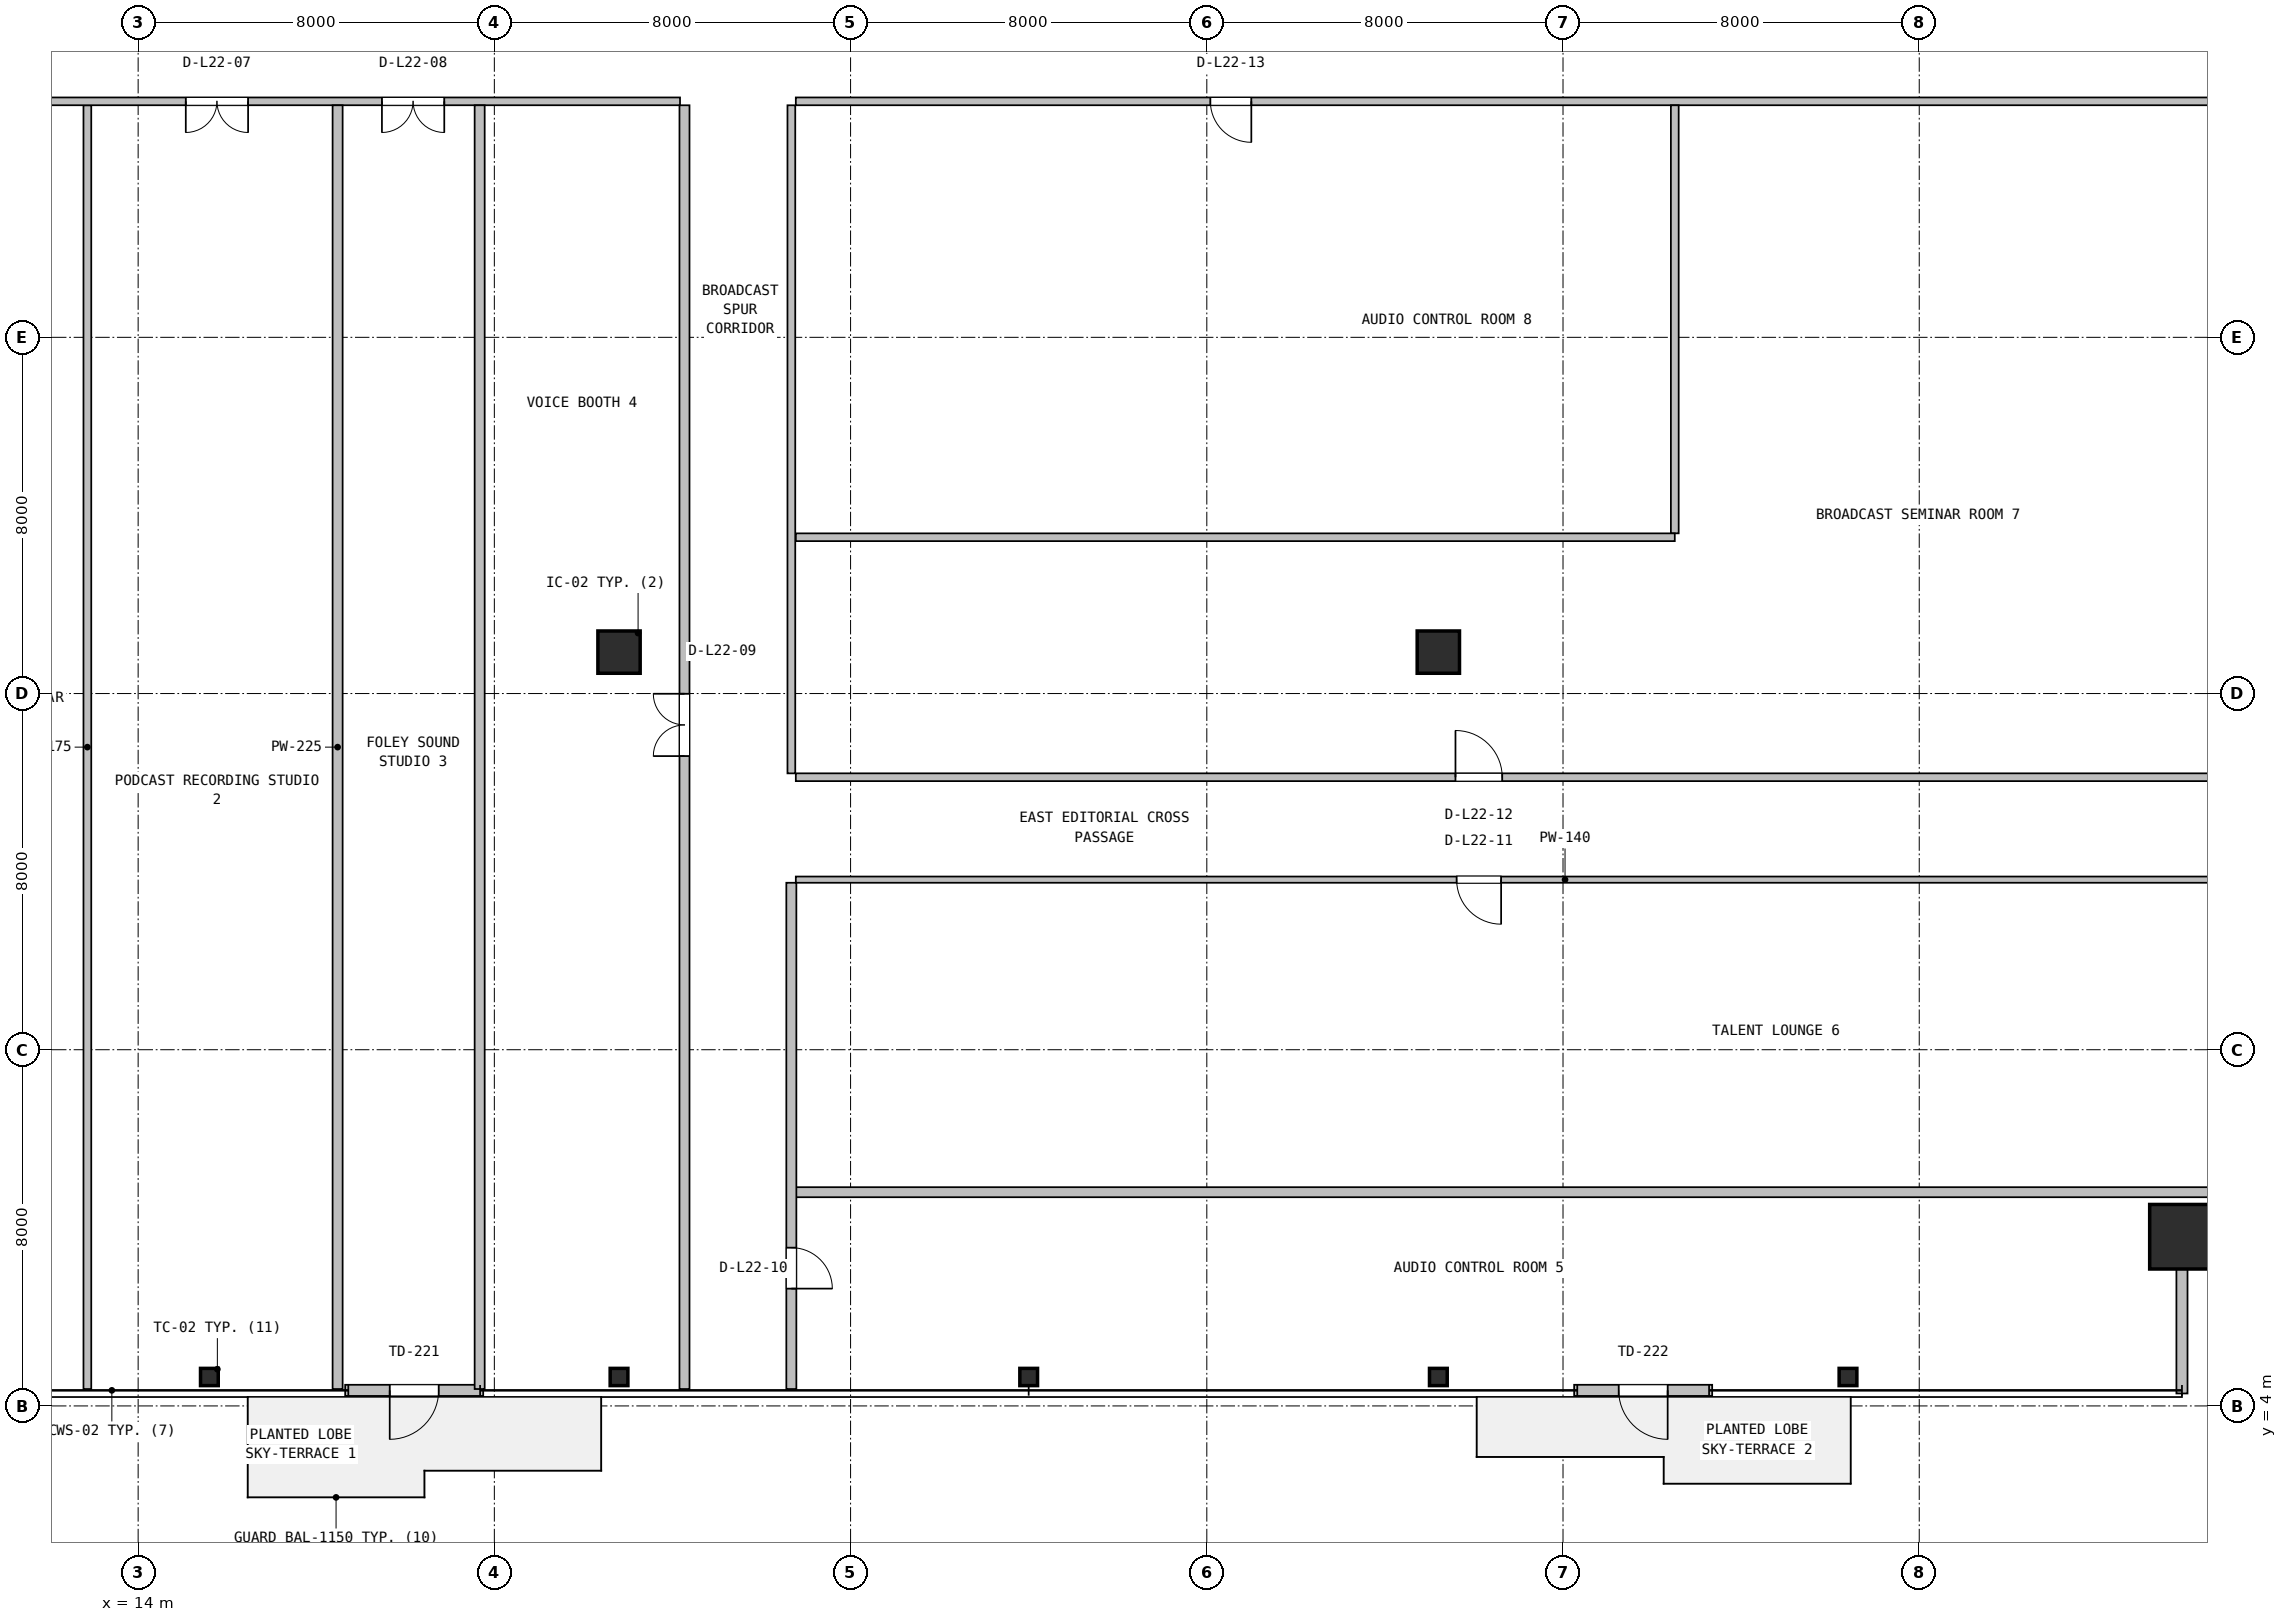
"""IFC4 building model, lengths in metres.
Left out: names, types, materials, properties, quantities, classifications, styles, units other than length and angle.
Written with IfcOpenShell. Run it as: python <this file> out.ifc"""

import sys

from ifc_helpers import new_model, si_unit, direction, frame, frame_2d, origin, origin_2d, place, context, subcontext, project, spatial, rectangle, hollow_rectangle, i_section, extrude, source, transform, mapped, element, fill, save


model = new_model("IFC4")
c1 = context("Model", 3, precision=1e-05, world=origin(), true_north=direction((0.0, 1.0)))
c2 = subcontext(c1, "Body", "Model", "MODEL_VIEW")
j1 = project(units=[si_unit("LENGTHUNIT", "METRE"), si_unit("PLANEANGLEUNIT", "RADIAN")], contexts=[c1])
p1 = place(None, origin())
s1 = spatial("IfcSite", under=j1, at=p1, CompositionType="ELEMENT")
p2 = place(p1, origin())
s2 = spatial("IfcBuilding", under=s1, at=p2, CompositionType="ELEMENT")
p3 = place(p2, frame((0.0, 0.0, 94.6)))
s3 = spatial("IfcBuildingStorey", under=s2, at=p3, CompositionType="ELEMENT", Elevation=94.6)
m1 = source(origin(), c2, "Body", "SweptSolid", [
    extrude(hollow_rectangle(XDim=1.45, YDim=1.45, WallThickness=0.055, at=origin_2d()), origin(), (0.0, 0.0, 1.0), 3.8),
])
p4 = place(p3, frame((59.9, 7.8, 0.0), z_axis=(0.0, 0.0, 1.0), x_axis=(1.0, 0.0, 0.0)))
e1 = element("IfcColumn", 1, at=p4, inside=s3, PredefinedType="COLUMN", context=c2, shape_type="MappedRepresentation", body=[
    mapped(m1, transform((0.0, 0.0, 0.0), x_axis=(1.0, 0.0, 0.0), y_axis=(0.0, 1.0, 0.0), z_axis=(0.0, 0.0, 1.0), scale=1.0)),
])
m2 = source(origin(), c2, "Body", "SweptSolid", [
    extrude(i_section(OverallWidth=0.398, OverallDepth=0.387, WebThickness=0.021, FlangeThickness=0.033, FilletRadius=0.018, at=origin_2d()), origin(), (0.0, 0.0, 1.0), 3.8),
])
for number, where, z_axis, x_axis in (
    (2, (15.6, 4.65, 0.0), (0.0, 0.0, 1.0), (1.0, 0.0, 0.0)),
    (3, (24.8, 4.65, 0.0), (0.0, 0.0, 1.0), (1.0, 0.0, 0.0)),
    (4, (34.0, 4.65, 0.0), (0.0, 0.0, 1.0), (1.0, 0.0, 0.0)),
    (5, (43.2, 4.65, 0.0), (0.0, 0.0, 1.0), (1.0, 0.0, 0.0)),
    (6, (52.4, 4.65, 0.0), (0.0, 0.0, 1.0), (1.0, 0.0, 0.0)),
):
    element("IfcColumn", number, at=place(p3, frame(where, z_axis=z_axis, x_axis=x_axis)), inside=s3, PredefinedType="COLUMN", context=c2, shape_type="MappedRepresentation", body=[
        mapped(m2, transform((0.0, 0.0, 0.0), x_axis=(1.0, 0.0, 0.0), y_axis=(0.0, 1.0, 0.0), z_axis=(0.0, 0.0, 1.0), scale=1.0)),
    ])
m3 = source(origin(), c2, "Body", "SweptSolid", [
    extrude(rectangle(XDim=0.95, YDim=0.95, at=origin_2d()), origin(), (0.0, 0.0, 1.0), 3.8),
])
for number, where, z_axis, x_axis in (
    (7, (24.8, 20.93, 0.0), (0.0, 0.0, 1.0), (1.0, 0.0, 0.0)),
    (8, (43.2, 20.93, 0.0), (0.0, 0.0, 1.0), (1.0, 0.0, 0.0)),
):
    element("IfcColumn", number, at=place(p3, frame(where, z_axis=z_axis, x_axis=x_axis)), inside=s3, PredefinedType="COLUMN", context=c2, shape_type="MappedRepresentation", body=[
        mapped(m3, transform((0.0, 0.0, 0.0), x_axis=(1.0, 0.0, 0.0), y_axis=(0.0, 1.0, 0.0), z_axis=(0.0, 0.0, 1.0), scale=1.0)),
    ])
p5 = place(p3, frame((18.65, 4.35, 0.0), z_axis=(0.0, 0.0, 1.0), x_axis=(1.0, 0.0, 0.0)))
e9 = element("IfcWall", 9, at=p5, inside=s3, PredefinedType="SOLIDWALL", context=c2, shape_type="SweptSolid", body=[
    extrude(rectangle(XDim=3.1, YDim=0.25, at=frame_2d((1.55, 0.0))), origin(), (0.0, 0.0, 1.0), 3.5),
])
p6 = place(p5, frame((1.0, 0.0, 0.0)))
e10 = element("IfcOpeningElement", 10, at=p6, cuts=e9, PredefinedType="OPENING", context=c2, shape_type="SweptSolid", body=[
    extrude(rectangle(XDim=1.1, YDim=2.15, at=frame_2d((0.55, 1.075))), frame((0.0, 0.135, 0.0), z_axis=(0.0, -1.0, 0.0), x_axis=(1.0, 0.0, 0.0)), (0.0, 0.0, 1.0), 0.27),
])
p7 = place(p3, frame((46.25, 4.35, 0.0), z_axis=(0.0, 0.0, 1.0), x_axis=(1.0, 0.0, 0.0)))
e11 = element("IfcWall", 11, at=p7, inside=s3, PredefinedType="SOLIDWALL", context=c2, shape_type="SweptSolid", body=[
    extrude(rectangle(XDim=3.1, YDim=0.25, at=frame_2d((1.55, 0.0))), origin(), (0.0, 0.0, 1.0), 3.5),
])
p8 = place(p7, frame((1.0, 0.0, 0.0)))
e12 = element("IfcOpeningElement", 12, at=p8, cuts=e11, PredefinedType="OPENING", context=c2, shape_type="SweptSolid", body=[
    extrude(rectangle(XDim=1.1, YDim=2.15, at=frame_2d((0.55, 1.075))), frame((0.0, 0.135, 0.0), z_axis=(0.0, -1.0, 0.0), x_axis=(1.0, 0.0, 0.0)), (0.0, 0.0, 1.0), 0.27),
])
p9 = place(p3, frame((59.9, 4.28, 0.0), z_axis=(0.0, 0.0, 1.0), x_axis=(0.0, 1.0, 0.0)))
e13 = element("IfcWall", 13, at=p9, inside=s3, PredefinedType="SOLIDWALL", context=c2, shape_type="SweptSolid", body=[
    extrude(rectangle(XDim=3.6, YDim=0.25, at=frame_2d((1.8, 0.0))), origin(), (0.0, 0.0, 1.0), 3.078),
])
p10 = place(p3, frame((12.86, 4.38, 0.0), z_axis=(0.0, 0.0, 1.0), x_axis=(0.0, 1.0, 0.0)))
e14 = element("IfcWall", 14, at=p10, inside=s3, PredefinedType="PARTITIONING", context=c2, shape_type="SweptSolid", body=[
    extrude(rectangle(XDim=28.832, YDim=0.175, at=frame_2d((14.416, 0.0))), origin(), (0.0, 0.0, 1.0), 3.078),
])
p11 = place(p3, frame((4.68, 33.3, 0.0), z_axis=(0.0, 0.0, 1.0), x_axis=(1.0, 0.0, 0.0)))
e15 = element("IfcWall", 15, at=p11, inside=s3, PredefinedType="PARTITIONING", context=c2, shape_type="SweptSolid", body=[
    extrude(rectangle(XDim=21.49, YDim=0.175, at=frame_2d((10.745, 0.0))), origin(), (0.0, 0.0, 1.0), 2.8),
])
p12 = place(p11, frame((5.5, 0.0, 0.0)))
e16 = element("IfcOpeningElement", 16, at=p12, cuts=e15, PredefinedType="OPENING", context=c2, shape_type="SweptSolid", body=[
    extrude(rectangle(XDim=1.05, YDim=2.1, at=frame_2d((0.525, 1.05))), frame((0.0, 0.098, 0.0), z_axis=(0.0, -1.0, 0.0), x_axis=(1.0, 0.0, 0.0)), (0.0, 0.0, 1.0), 0.195),
])
p13 = place(p11, frame((10.39, 0.0, 0.0)))
e17 = element("IfcOpeningElement", 17, at=p13, cuts=e15, PredefinedType="OPENING", context=c2, shape_type="SweptSolid", body=[
    extrude(rectangle(XDim=1.4, YDim=2.12, at=frame_2d((0.7, 1.06))), frame((0.0, 0.098, 0.0), z_axis=(0.0, -1.0, 0.0), x_axis=(1.0, 0.0, 0.0)), (0.0, 0.0, 1.0), 0.195),
])
p14 = place(p11, frame((14.795, 0.0, 0.0)))
e18 = element("IfcOpeningElement", 18, at=p14, cuts=e15, PredefinedType="OPENING", context=c2, shape_type="SweptSolid", body=[
    extrude(rectangle(XDim=1.4, YDim=2.12, at=frame_2d((0.7, 1.06))), frame((0.0, 0.098, 0.0), z_axis=(0.0, -1.0, 0.0), x_axis=(1.0, 0.0, 0.0)), (0.0, 0.0, 1.0), 0.195),
])
for number, where, z_axis, x_axis in (
    (19, (18.48, 4.38, 0.0), (0.0, 0.0, 1.0), (0.0, 1.0, 0.0)),
    (20, (21.67, 4.38, 0.0), (0.0, 0.0, 1.0), (0.0, 1.0, 0.0)),
):
    element("IfcWall", number, at=place(p3, frame(where, z_axis=z_axis, x_axis=x_axis)), inside=s3, PredefinedType="PARTITIONING", context=c2, shape_type="SweptSolid", body=[
        extrude(rectangle(XDim=28.832, YDim=0.225, at=frame_2d((14.416, 0.0))), origin(), (0.0, 0.0, 1.0), 3.078),
    ])
p15 = place(p3, frame((26.27, 4.38, 0.0), z_axis=(0.0, 0.0, 1.0), x_axis=(0.0, 1.0, 0.0)))
e21 = element("IfcWall", 21, at=p15, inside=s3, PredefinedType="PARTITIONING", context=c2, shape_type="SweptSolid", body=[
    extrude(rectangle(XDim=28.832, YDim=0.225, at=frame_2d((14.416, 0.0))), origin(), (0.0, 0.0, 1.0), 2.8),
])
p16 = place(p15, frame((14.215, 0.0, 0.0)))
e22 = element("IfcOpeningElement", 22, at=p16, cuts=e21, PredefinedType="OPENING", context=c2, shape_type="SweptSolid", body=[
    extrude(rectangle(XDim=1.4, YDim=2.12, at=frame_2d((0.7, 1.06))), frame((0.0, 0.123, 0.0), z_axis=(0.0, -1.0, 0.0), x_axis=(1.0, 0.0, 0.0)), (0.0, 0.0, 1.0), 0.245),
])
p17 = place(p3, frame((28.77, 8.8, 0.0), z_axis=(0.0, 0.0, 1.0), x_axis=(1.0, 0.0, 0.0)))
e23 = element("IfcWall", 23, at=p17, inside=s3, PredefinedType="PARTITIONING", context=c2, shape_type="SweptSolid", body=[
    extrude(rectangle(XDim=34.55, YDim=0.225, at=frame_2d((17.275, 0.0))), origin(), (0.0, 0.0, 1.0), 2.8),
])
p18 = place(p3, frame((28.67, 4.38, 0.0), z_axis=(0.0, 0.0, 1.0), x_axis=(0.0, 1.0, 0.0)))
e24 = element("IfcWall", 24, at=p18, inside=s3, PredefinedType="PARTITIONING", context=c2, shape_type="SweptSolid", body=[
    extrude(rectangle(XDim=11.37, YDim=0.225, at=frame_2d((5.685, 0.0))), origin(), (0.0, 0.0, 1.0), 3.078),
])
p19 = place(p18, frame((2.255, 0.0, 0.0)))
e25 = element("IfcOpeningElement", 25, at=p19, cuts=e24, PredefinedType="OPENING", context=c2, shape_type="SweptSolid", body=[
    extrude(rectangle(XDim=0.92, YDim=2.08, at=frame_2d((0.46, 1.04))), frame((0.0, 0.123, 0.0), z_axis=(0.0, -1.0, 0.0), x_axis=(1.0, 0.0, 0.0)), (0.0, 0.0, 1.0), 0.245),
])
p20 = place(p3, frame((28.77, 15.82, 0.0), z_axis=(0.0, 0.0, 1.0), x_axis=(1.0, 0.0, 0.0)))
e26 = element("IfcWall", 26, at=p20, inside=s3, PredefinedType="PARTITIONING", context=c2, shape_type="SweptSolid", body=[
    extrude(rectangle(XDim=34.55, YDim=0.14, at=frame_2d((17.275, 0.0))), origin(), (0.0, 0.0, 1.0), 2.8),
])
p21 = place(p20, frame((14.84, 0.0, 0.0)))
e27 = element("IfcOpeningElement", 27, at=p21, cuts=e26, PredefinedType="OPENING", context=c2, shape_type="SweptSolid", body=[
    extrude(rectangle(XDim=1.0, YDim=2.1, at=frame_2d((0.5, 1.05))), frame((0.0, 0.08, 0.0), z_axis=(0.0, -1.0, 0.0), x_axis=(1.0, 0.0, 0.0)), (0.0, 0.0, 1.0), 0.16),
])
p22 = place(p3, frame((28.77, 18.12, 0.0), z_axis=(0.0, 0.0, 1.0), x_axis=(1.0, 0.0, 0.0)))
e28 = element("IfcWall", 28, at=p22, inside=s3, PredefinedType="PARTITIONING", context=c2, shape_type="SweptSolid", body=[
    extrude(rectangle(XDim=34.55, YDim=0.175, at=frame_2d((17.275, 0.0))), origin(), (0.0, 0.0, 1.0), 2.8),
])
p23 = place(p22, frame((14.815, 0.0, 0.0)))
e29 = element("IfcOpeningElement", 29, at=p23, cuts=e28, PredefinedType="OPENING", context=c2, shape_type="SweptSolid", body=[
    extrude(rectangle(XDim=1.05, YDim=2.1, at=frame_2d((0.525, 1.05))), frame((0.0, 0.098, 0.0), z_axis=(0.0, -1.0, 0.0), x_axis=(1.0, 0.0, 0.0)), (0.0, 0.0, 1.0), 0.195),
])
p24 = place(p3, frame((28.77, 33.3, 0.0), z_axis=(0.0, 0.0, 1.0), x_axis=(1.0, 0.0, 0.0)))
e30 = element("IfcWall", 30, at=p24, inside=s3, PredefinedType="PARTITIONING", context=c2, shape_type="SweptSolid", body=[
    extrude(rectangle(XDim=34.55, YDim=0.175, at=frame_2d((17.275, 0.0))), origin(), (0.0, 0.0, 1.0), 2.8),
])
p25 = place(p24, frame((9.31, 0.0, 0.0)))
e31 = element("IfcOpeningElement", 31, at=p25, cuts=e30, PredefinedType="OPENING", context=c2, shape_type="SweptSolid", body=[
    extrude(rectangle(XDim=0.92, YDim=2.08, at=frame_2d((0.46, 1.04))), frame((0.0, 0.098, 0.0), z_axis=(0.0, -1.0, 0.0), x_axis=(1.0, 0.0, 0.0)), (0.0, 0.0, 1.0), 0.195),
])
p26 = place(p3, frame((48.51, 23.598, 0.0), z_axis=(0.0, 0.0, 1.0), x_axis=(0.0, 1.0, 0.0)))
e32 = element("IfcWall", 32, at=p26, inside=s3, PredefinedType="PARTITIONING", context=c2, shape_type="SweptSolid", body=[
    extrude(rectangle(XDim=9.614, YDim=0.175, at=frame_2d((4.807, 0.0))), origin(), (0.0, 0.0, 1.0), 3.192),
])
p27 = place(p3, frame((28.77, 23.51, 0.0), z_axis=(0.0, 0.0, 1.0), x_axis=(1.0, 0.0, 0.0)))
e33 = element("IfcWall", 33, at=p27, inside=s3, PredefinedType="PARTITIONING", context=c2, shape_type="SweptSolid", body=[
    extrude(rectangle(XDim=19.74, YDim=0.175, at=frame_2d((9.87, 0.0))), origin(), (0.0, 0.0, 1.0), 2.8),
])
p28 = place(p3, frame((28.67, 18.207, 0.0), z_axis=(0.0, 0.0, 1.0), x_axis=(0.0, 1.0, 0.0)))
e34 = element("IfcWall", 34, at=p28, inside=s3, PredefinedType="PARTITIONING", context=c2, shape_type="SweptSolid", body=[
    extrude(rectangle(XDim=15.005, YDim=0.175, at=frame_2d((7.502, 0.0))), origin(), (0.0, 0.0, 1.0), 2.8),
])
m4 = source(origin(), c2, "Body", "SweptSolid", [
    extrude(rectangle(XDim=1.1, YDim=2.15, at=frame_2d((0.55, 1.075))), frame((0.0, 0.025, 0.0), z_axis=(0.0, -1.0, 0.0), x_axis=(1.0, 0.0, 0.0)), (0.0, 0.0, 1.0), 0.05),
])
p29 = place(p6, frame((1.1, 0.0, 0.0), z_axis=(0.0, 0.0, 1.0), x_axis=(-1.0, 0.0, 0.0)))
e35 = element("IfcDoor", 35, at=p29, inside=s3, OperationType="SINGLE_SWING_LEFT", PredefinedType="DOOR", context=c2, shape_type="MappedRepresentation", body=[
    mapped(m4, transform((0.0, 0.0, 0.0), x_axis=(1.0, 0.0, 0.0), y_axis=(0.0, 1.0, 0.0), z_axis=(0.0, 0.0, 1.0), scale=1.0)),
])
fill(e10, e35)
p30 = place(p8, frame((1.1, 0.0, 0.0), z_axis=(0.0, 0.0, 1.0), x_axis=(-1.0, 0.0, 0.0)))
e36 = element("IfcDoor", 36, at=p30, inside=s3, OperationType="SINGLE_SWING_RIGHT", PredefinedType="DOOR", context=c2, shape_type="MappedRepresentation", body=[
    mapped(m4, transform((0.0, 0.0, 0.0), x_axis=(1.0, 0.0, 0.0), y_axis=(0.0, 1.0, 0.0), z_axis=(0.0, 0.0, 1.0), scale=1.0)),
])
fill(e12, e36)
m5 = source(origin(), c2, "Body", "SweptSolid", [
    extrude(rectangle(XDim=1.4, YDim=2.12, at=frame_2d((0.7, 1.06))), frame((0.0, 0.025, 0.0), z_axis=(0.0, -1.0, 0.0), x_axis=(1.0, 0.0, 0.0)), (0.0, 0.0, 1.0), 0.05),
])
p31 = place(p13, frame((1.4, 0.0, 0.0), z_axis=(0.0, 0.0, 1.0), x_axis=(-1.0, 0.0, 0.0)))
e37 = element("IfcDoor", 37, at=p31, inside=s3, OperationType="DOUBLE_DOOR_SINGLE_SWING", PredefinedType="DOOR", context=c2, shape_type="MappedRepresentation", body=[
    mapped(m5, transform((0.0, 0.0, 0.0), x_axis=(1.0, 0.0, 0.0), y_axis=(0.0, 1.0, 0.0), z_axis=(0.0, 0.0, 1.0), scale=1.0)),
])
fill(e17, e37)
p32 = place(p14, frame((1.4, 0.0, 0.0), z_axis=(0.0, 0.0, 1.0), x_axis=(-1.0, 0.0, 0.0)))
e38 = element("IfcDoor", 38, at=p32, inside=s3, OperationType="DOUBLE_DOOR_SINGLE_SWING", PredefinedType="DOOR", context=c2, shape_type="MappedRepresentation", body=[
    mapped(m5, transform((0.0, 0.0, 0.0), x_axis=(1.0, 0.0, 0.0), y_axis=(0.0, 1.0, 0.0), z_axis=(0.0, 0.0, 1.0), scale=1.0)),
])
fill(e18, e38)
p33 = place(p16, origin())
e39 = element("IfcDoor", 39, at=p33, inside=s3, OperationType="DOUBLE_DOOR_SINGLE_SWING", PredefinedType="DOOR", context=c2, shape_type="MappedRepresentation", body=[
    mapped(m5, transform((0.0, 0.0, 0.0), x_axis=(1.0, 0.0, 0.0), y_axis=(0.0, 1.0, 0.0), z_axis=(0.0, 0.0, 1.0), scale=1.0)),
])
fill(e22, e39)
m6 = source(origin(), c2, "Body", "SweptSolid", [
    extrude(rectangle(XDim=0.92, YDim=2.08, at=frame_2d((0.46, 1.04))), frame((0.0, 0.025, 0.0), z_axis=(0.0, -1.0, 0.0), x_axis=(1.0, 0.0, 0.0)), (0.0, 0.0, 1.0), 0.05),
])
p34 = place(p19, frame((0.92, 0.0, 0.0), z_axis=(0.0, 0.0, 1.0), x_axis=(-1.0, 0.0, 0.0)))
e40 = element("IfcDoor", 40, at=p34, inside=s3, OperationType="SINGLE_SWING_LEFT", PredefinedType="DOOR", context=c2, shape_type="MappedRepresentation", body=[
    mapped(m6, transform((0.0, 0.0, 0.0), x_axis=(1.0, 0.0, 0.0), y_axis=(0.0, 1.0, 0.0), z_axis=(0.0, 0.0, 1.0), scale=1.0)),
])
fill(e25, e40)
m7 = source(origin(), c2, "Body", "SweptSolid", [
    extrude(rectangle(XDim=1.0, YDim=2.1, at=frame_2d((0.5, 1.05))), frame((0.0, 0.025, 0.0), z_axis=(0.0, -1.0, 0.0), x_axis=(1.0, 0.0, 0.0)), (0.0, 0.0, 1.0), 0.05),
])
p35 = place(p21, frame((1.0, 0.0, 0.0), z_axis=(0.0, 0.0, 1.0), x_axis=(-1.0, 0.0, 0.0)))
e41 = element("IfcDoor", 41, at=p35, inside=s3, OperationType="SINGLE_SWING_RIGHT", PredefinedType="DOOR", context=c2, shape_type="MappedRepresentation", body=[
    mapped(m7, transform((0.0, 0.0, 0.0), x_axis=(1.0, 0.0, 0.0), y_axis=(0.0, 1.0, 0.0), z_axis=(0.0, 0.0, 1.0), scale=1.0)),
])
fill(e27, e41)
m8 = source(origin(), c2, "Body", "SweptSolid", [
    extrude(rectangle(XDim=1.05, YDim=2.1, at=frame_2d((0.525, 1.05))), frame((0.0, 0.025, 0.0), z_axis=(0.0, -1.0, 0.0), x_axis=(1.0, 0.0, 0.0)), (0.0, 0.0, 1.0), 0.05),
])
p36 = place(p23, origin())
e42 = element("IfcDoor", 42, at=p36, inside=s3, OperationType="SINGLE_SWING_LEFT", PredefinedType="DOOR", context=c2, shape_type="MappedRepresentation", body=[
    mapped(m8, transform((0.0, 0.0, 0.0), x_axis=(1.0, 0.0, 0.0), y_axis=(0.0, 1.0, 0.0), z_axis=(0.0, 0.0, 1.0), scale=1.0)),
])
fill(e29, e42)
p37 = place(p25, frame((0.92, 0.0, 0.0), z_axis=(0.0, 0.0, 1.0), x_axis=(-1.0, 0.0, 0.0)))
e43 = element("IfcDoor", 43, at=p37, inside=s3, OperationType="SINGLE_SWING_RIGHT", PredefinedType="DOOR", context=c2, shape_type="MappedRepresentation", body=[
    mapped(m6, transform((0.0, 0.0, 0.0), x_axis=(1.0, 0.0, 0.0), y_axis=(0.0, 1.0, 0.0), z_axis=(0.0, 0.0, 1.0), scale=1.0)),
])
fill(e31, e43)
save(model, sys.argv[1])
